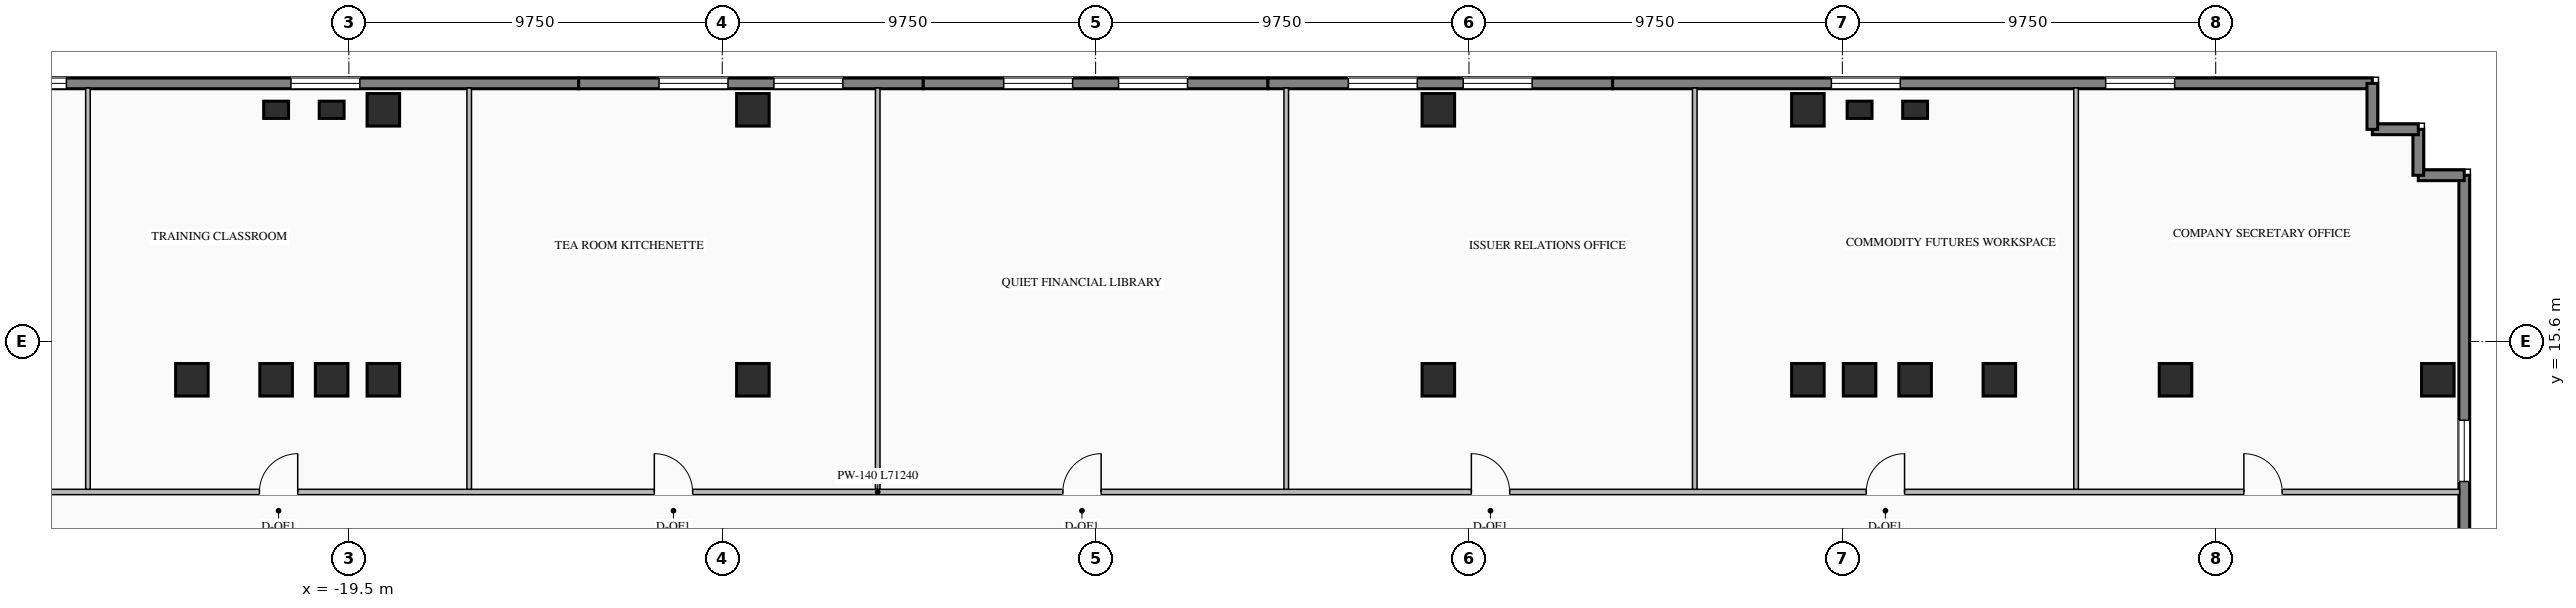
"""IFC4 building model, lengths in metres.
Left out: names, types, materials, properties, quantities, classifications, styles, units other than length and angle.
Written with IfcOpenShell. Run it as: python <this file> out.ifc"""

import sys

from ifc_helpers import new_model, si_unit, direction, frame, frame_2d, origin, origin_2d, place, context, subcontext, project, spatial, rectangle, i_section, extrude, element, fill, save


model = new_model("IFC4")
c1 = context("Model", 3, precision=1e-05, world=origin(), true_north=direction((0.0, 1.0)))
c2 = subcontext(c1, "Body", "Model", "MODEL_VIEW")
j1 = project(units=[si_unit("LENGTHUNIT", "METRE"), si_unit("PLANEANGLEUNIT", "RADIAN")], contexts=[c1])
p1 = place(None, origin())
s1 = spatial("IfcSite", under=j1, at=p1, CompositionType="ELEMENT")
p2 = place(p1, origin())
s2 = spatial("IfcBuilding", under=s1, at=p2, CompositionType="ELEMENT")
p3 = place(p2, frame((0.0, 0.0, 58.8)))
s3 = spatial("IfcBuildingStorey", under=s2, at=p3, CompositionType="ELEMENT", Elevation=58.8)
for number, where, z_axis, x_axis in (
    (1, (-21.4, 14.6, 0.0), (0.0, 0.0, 1.0), (1.0, 0.0, 0.0)),
    (2, (-19.95, 14.6, 0.0), (0.0, 0.0, 1.0), (1.0, 0.0, 0.0)),
    (3, (-18.6, 14.6, 0.0), (0.0, 0.0, 1.0), (1.0, 0.0, 0.0)),
    (4, (-8.95, 14.6, 0.0), (0.0, 0.0, 1.0), (1.0, 0.0, 0.0)),
    (5, (8.95, 14.6, 0.0), (0.0, 0.0, 1.0), (1.0, 0.0, 0.0)),
    (6, (18.6, 14.6, 0.0), (0.0, 0.0, 1.0), (1.0, 0.0, 0.0)),
    (7, (19.95, 14.6, 0.0), (0.0, 0.0, 1.0), (1.0, 0.0, 0.0)),
    (8, (21.4, 14.6, 0.0), (0.0, 0.0, 1.0), (1.0, 0.0, 0.0)),
    (9, (-23.6, 14.6, 0.0), (0.0, 0.0, 1.0), (1.0, 0.0, 0.0)),
    (10, (23.6, 14.6, 0.0), (0.0, 0.0, 1.0), (1.0, 0.0, 0.0)),
    (11, (28.2, 14.6, 0.0), (0.0, 0.0, 1.0), (1.0, 0.0, 0.0)),
    (12, (-18.6, 21.65, 0.0), (0.0, 0.0, 1.0), (1.0, 0.0, 0.0)),
    (13, (-8.95, 21.65, 0.0), (0.0, 0.0, 1.0), (1.0, 0.0, 0.0)),
    (14, (8.95, 21.65, 0.0), (0.0, 0.0, 1.0), (1.0, 0.0, 0.0)),
    (15, (18.6, 21.65, 0.0), (0.0, 0.0, 1.0), (1.0, 0.0, 0.0)),
    (16, (35.05, 14.6, 0.0), (0.0, 0.0, 1.0), (1.0, 0.0, 0.0)),
):
    element("IfcColumn", number, at=place(p3, frame(where, z_axis=z_axis, x_axis=x_axis)), inside=s3, PredefinedType="COLUMN", context=c2, shape_type="SweptSolid", body=[
        extrude(i_section(OverallWidth=0.85, OverallDepth=0.85, WebThickness=0.032, FlangeThickness=0.048, at=origin_2d()), origin(), (0.0, 0.0, 1.0), 3.45),
    ])
for number, where, z_axis, x_axis in (
    (17, (-21.4, 21.65, 0.0), (0.0, 0.0, 1.0), (1.0, 0.0, 0.0)),
    (18, (-19.95, 21.65, 0.0), (0.0, 0.0, 1.0), (1.0, 0.0, 0.0)),
    (19, (19.95, 21.65, 0.0), (0.0, 0.0, 1.0), (1.0, 0.0, 0.0)),
    (20, (21.4, 21.65, 0.0), (0.0, 0.0, 1.0), (1.0, 0.0, 0.0)),
):
    element("IfcColumn", number, at=place(p3, frame(where, z_axis=z_axis, x_axis=x_axis)), inside=s3, PredefinedType="PILASTER", context=c2, shape_type="SweptSolid", body=[
        extrude(rectangle(XDim=0.65, YDim=0.45, at=origin_2d()), origin(), (0.0, 0.0, 1.0), 3.45),
    ])
p4 = place(p3, frame((-33.34, 22.34, 0.0), z_axis=(0.0, 0.0, 1.0), x_axis=(1.0, 0.0, 0.0)))
e21 = element("IfcWall", 21, at=p4, inside=s3, PredefinedType="STANDARD", context=c2, shape_type="SweptSolid", body=[
    extrude(rectangle(XDim=19.84, YDim=0.28, at=frame_2d((9.92, 0.0))), origin(), (0.0, 0.0, 1.0), 3.25),
])
p5 = place(p4, frame((4.663, 0.0, 0.76)))
e22 = element("IfcOpeningElement", 22, at=p5, cuts=e21, PredefinedType="OPENING", context=c2, shape_type="SweptSolid", body=[
    extrude(rectangle(XDim=1.8, YDim=1.95, at=frame_2d((0.9, 0.975))), frame((0.0, 0.15, 0.0), z_axis=(0.0, -1.0, 0.0), x_axis=(1.0, 0.0, 0.0)), (0.0, 0.0, 1.0), 0.3),
])
p6 = place(p4, frame((12.327, 0.0, 0.76)))
e23 = element("IfcOpeningElement", 23, at=p6, cuts=e21, PredefinedType="OPENING", context=c2, shape_type="SweptSolid", body=[
    extrude(rectangle(XDim=1.8, YDim=1.95, at=frame_2d((0.9, 0.975))), frame((0.0, 0.15, 0.0), z_axis=(0.0, -1.0, 0.0), x_axis=(1.0, 0.0, 0.0)), (0.0, 0.0, 1.0), 0.3),
])
p7 = place(p3, frame((-13.5, 22.34, 0.0), z_axis=(0.0, 0.0, 1.0), x_axis=(1.0, 0.0, 0.0)))
e24 = element("IfcWall", 24, at=p7, inside=s3, PredefinedType="STANDARD", context=c2, shape_type="SweptSolid", body=[
    extrude(rectangle(XDim=9.0, YDim=0.28, at=frame_2d((4.5, 0.0))), origin(), (0.0, 0.0, 1.0), 3.25),
])
p8 = place(p7, frame((2.1, 0.0, 0.76)))
e25 = element("IfcOpeningElement", 25, at=p8, cuts=e24, PredefinedType="OPENING", context=c2, shape_type="SweptSolid", body=[
    extrude(rectangle(XDim=1.8, YDim=1.95, at=frame_2d((0.9, 0.975))), frame((0.0, 0.15, 0.0), z_axis=(0.0, -1.0, 0.0), x_axis=(1.0, 0.0, 0.0)), (0.0, 0.0, 1.0), 0.3),
])
p9 = place(p7, frame((5.1, 0.0, 0.76)))
e26 = element("IfcOpeningElement", 26, at=p9, cuts=e24, PredefinedType="OPENING", context=c2, shape_type="SweptSolid", body=[
    extrude(rectangle(XDim=1.8, YDim=1.95, at=frame_2d((0.9, 0.975))), frame((0.0, 0.15, 0.0), z_axis=(0.0, -1.0, 0.0), x_axis=(1.0, 0.0, 0.0)), (0.0, 0.0, 1.0), 0.3),
])
p10 = place(p3, frame((-4.5, 22.34, 0.0), z_axis=(0.0, 0.0, 1.0), x_axis=(1.0, 0.0, 0.0)))
e27 = element("IfcWall", 27, at=p10, inside=s3, PredefinedType="STANDARD", context=c2, shape_type="SweptSolid", body=[
    extrude(rectangle(XDim=9.0, YDim=0.28, at=frame_2d((4.5, 0.0))), origin(), (0.0, 0.0, 1.0), 3.25),
])
p11 = place(p10, frame((2.1, 0.0, 0.76)))
e28 = element("IfcOpeningElement", 28, at=p11, cuts=e27, PredefinedType="OPENING", context=c2, shape_type="SweptSolid", body=[
    extrude(rectangle(XDim=1.8, YDim=1.95, at=frame_2d((0.9, 0.975))), frame((0.0, 0.15, 0.0), z_axis=(0.0, -1.0, 0.0), x_axis=(1.0, 0.0, 0.0)), (0.0, 0.0, 1.0), 0.3),
])
p12 = place(p10, frame((5.1, 0.0, 0.76)))
e29 = element("IfcOpeningElement", 29, at=p12, cuts=e27, PredefinedType="OPENING", context=c2, shape_type="SweptSolid", body=[
    extrude(rectangle(XDim=1.8, YDim=1.95, at=frame_2d((0.9, 0.975))), frame((0.0, 0.15, 0.0), z_axis=(0.0, -1.0, 0.0), x_axis=(1.0, 0.0, 0.0)), (0.0, 0.0, 1.0), 0.3),
])
p13 = place(p3, frame((4.5, 22.34, 0.0), z_axis=(0.0, 0.0, 1.0), x_axis=(1.0, 0.0, 0.0)))
e30 = element("IfcWall", 30, at=p13, inside=s3, PredefinedType="STANDARD", context=c2, shape_type="SweptSolid", body=[
    extrude(rectangle(XDim=9.0, YDim=0.28, at=frame_2d((4.5, 0.0))), origin(), (0.0, 0.0, 1.0), 3.25),
])
p14 = place(p13, frame((2.1, 0.0, 0.76)))
e31 = element("IfcOpeningElement", 31, at=p14, cuts=e30, PredefinedType="OPENING", context=c2, shape_type="SweptSolid", body=[
    extrude(rectangle(XDim=1.8, YDim=1.95, at=frame_2d((0.9, 0.975))), frame((0.0, 0.15, 0.0), z_axis=(0.0, -1.0, 0.0), x_axis=(1.0, 0.0, 0.0)), (0.0, 0.0, 1.0), 0.3),
])
p15 = place(p13, frame((5.1, 0.0, 0.76)))
e32 = element("IfcOpeningElement", 32, at=p15, cuts=e30, PredefinedType="OPENING", context=c2, shape_type="SweptSolid", body=[
    extrude(rectangle(XDim=1.8, YDim=1.95, at=frame_2d((0.9, 0.975))), frame((0.0, 0.15, 0.0), z_axis=(0.0, -1.0, 0.0), x_axis=(1.0, 0.0, 0.0)), (0.0, 0.0, 1.0), 0.3),
])
p16 = place(p3, frame((13.5, 22.34, 0.0), z_axis=(0.0, 0.0, 1.0), x_axis=(1.0, 0.0, 0.0)))
e33 = element("IfcWall", 33, at=p16, inside=s3, PredefinedType="STANDARD", context=c2, shape_type="SweptSolid", body=[
    extrude(rectangle(XDim=19.84, YDim=0.28, at=frame_2d((9.92, 0.0))), origin(), (0.0, 0.0, 1.0), 3.25),
])
p17 = place(p16, frame((5.713, 0.0, 0.76)))
e34 = element("IfcOpeningElement", 34, at=p17, cuts=e33, PredefinedType="OPENING", context=c2, shape_type="SweptSolid", body=[
    extrude(rectangle(XDim=1.8, YDim=1.95, at=frame_2d((0.9, 0.975))), frame((0.0, 0.15, 0.0), z_axis=(0.0, -1.0, 0.0), x_axis=(1.0, 0.0, 0.0)), (0.0, 0.0, 1.0), 0.3),
])
p18 = place(p16, frame((12.877, 0.0, 0.76)))
e35 = element("IfcOpeningElement", 35, at=p18, cuts=e33, PredefinedType="OPENING", context=c2, shape_type="SweptSolid", body=[
    extrude(rectangle(XDim=1.8, YDim=1.95, at=frame_2d((0.9, 0.975))), frame((0.0, 0.15, 0.0), z_axis=(0.0, -1.0, 0.0), x_axis=(1.0, 0.0, 0.0)), (0.0, 0.0, 1.0), 0.3),
])
p19 = place(p3, frame((35.74, 19.94, 0.0), z_axis=(0.0, 0.0, 1.0), x_axis=(0.0, -1.0, 0.0)))
e36 = element("IfcWall", 36, at=p19, inside=s3, PredefinedType="STANDARD", context=c2, shape_type="SweptSolid", body=[
    extrude(rectangle(XDim=19.94, YDim=0.28, at=frame_2d((9.97, 0.0))), origin(), (0.0, 0.0, 1.0), 3.25),
])
p20 = place(p19, frame((6.397, 0.0, 0.76)))
e37 = element("IfcOpeningElement", 37, at=p20, cuts=e36, PredefinedType="OPENING", context=c2, shape_type="SweptSolid", body=[
    extrude(rectangle(XDim=1.6, YDim=1.95, at=frame_2d((0.8, 0.975))), frame((0.0, 0.15, 0.0), z_axis=(0.0, -1.0, 0.0), x_axis=(1.0, 0.0, 0.0)), (0.0, 0.0, 1.0), 0.3),
])
p21 = place(p19, frame((12.493, 0.0, 0.76)))
e38 = element("IfcOpeningElement", 38, at=p21, cuts=e36, PredefinedType="OPENING", context=c2, shape_type="SweptSolid", body=[
    extrude(rectangle(XDim=1.6, YDim=1.95, at=frame_2d((0.8, 0.975))), frame((0.0, 0.15, 0.0), z_axis=(0.0, -1.0, 0.0), x_axis=(1.0, 0.0, 0.0)), (0.0, 0.0, 1.0), 0.3),
])
for number, where, z_axis, x_axis in (
    (39, (35.74, 19.94, 0.0), (0.0, 0.0, 1.0), (-1.0, 0.0, 0.0)),
    (40, (34.54, 19.94, 0.0), (0.0, 0.0, 1.0), (0.0, 1.0, 0.0)),
    (41, (34.54, 21.14, 0.0), (0.0, 0.0, 1.0), (-1.0, 0.0, 0.0)),
):
    element("IfcWall", number, at=place(p3, frame(where, z_axis=z_axis, x_axis=x_axis)), inside=s3, PredefinedType="STANDARD", context=c2, shape_type="SweptSolid", body=[
        extrude(rectangle(XDim=1.2, YDim=0.28, at=frame_2d((0.6, 0.0))), origin(), (0.0, 0.0, 1.0), 3.25),
    ])
p22 = place(p3, frame((33.34, 21.14, 0.0), z_axis=(0.0, 0.0, 1.0), x_axis=(0.0, 1.0, 0.0)))
e42 = element("IfcWall", 42, at=p22, inside=s3, PredefinedType="STANDARD", context=c2, shape_type="SweptSolid", body=[
    extrude(rectangle(XDim=1.2, YDim=0.28, at=frame_2d((0.6, 0.0))), origin(), (0.0, 0.0, 1.0), 3.25),
])
p23 = place(p3, frame((-35.62, 11.67, 0.0), z_axis=(0.0, 0.0, 1.0), x_axis=(1.0, 0.0, 0.0)))
e43 = element("IfcWall", 43, at=p23, inside=s3, PredefinedType="STANDARD", context=c2, shape_type="SweptSolid", body=[
    extrude(rectangle(XDim=71.24, YDim=0.14, at=frame_2d((35.62, 0.0))), origin(), (0.0, 0.0, 1.0), 3.25),
])
p24 = place(p23, frame((4.279, 0.0, 0.0)))
e44 = element("IfcOpeningElement", 44, at=p24, cuts=e43, PredefinedType="OPENING", context=c2, shape_type="SweptSolid", body=[
    extrude(rectangle(XDim=1.0, YDim=2.08, at=frame_2d((0.5, 1.04))), frame((0.0, 0.08, 0.0), z_axis=(0.0, -1.0, 0.0), x_axis=(1.0, 0.0, 0.0)), (0.0, 0.0, 1.0), 0.16),
])
p25 = place(p23, frame((13.784, 0.0, 0.0)))
e45 = element("IfcOpeningElement", 45, at=p25, cuts=e43, PredefinedType="OPENING", context=c2, shape_type="SweptSolid", body=[
    extrude(rectangle(XDim=1.0, YDim=2.08, at=frame_2d((0.5, 1.04))), frame((0.0, 0.08, 0.0), z_axis=(0.0, -1.0, 0.0), x_axis=(1.0, 0.0, 0.0)), (0.0, 0.0, 1.0), 0.16),
])
p26 = place(p23, frame((24.096, 0.0, 0.0)))
e46 = element("IfcOpeningElement", 46, at=p26, cuts=e43, PredefinedType="OPENING", context=c2, shape_type="SweptSolid", body=[
    extrude(rectangle(XDim=1.0, YDim=2.08, at=frame_2d((0.5, 1.04))), frame((0.0, 0.08, 0.0), z_axis=(0.0, -1.0, 0.0), x_axis=(1.0, 0.0, 0.0)), (0.0, 0.0, 1.0), 0.16),
])
p27 = place(p23, frame((34.764, 0.0, 0.0)))
e47 = element("IfcOpeningElement", 47, at=p27, cuts=e43, PredefinedType="OPENING", context=c2, shape_type="SweptSolid", body=[
    extrude(rectangle(XDim=1.0, YDim=2.08, at=frame_2d((0.5, 1.04))), frame((0.0, 0.08, 0.0), z_axis=(0.0, -1.0, 0.0), x_axis=(1.0, 0.0, 0.0)), (0.0, 0.0, 1.0), 0.16),
])
p28 = place(p23, frame((45.432, 0.0, 0.0)))
e48 = element("IfcOpeningElement", 48, at=p28, cuts=e43, PredefinedType="OPENING", context=c2, shape_type="SweptSolid", body=[
    extrude(rectangle(XDim=1.0, YDim=2.08, at=frame_2d((0.5, 1.04))), frame((0.0, 0.08, 0.0), z_axis=(0.0, -1.0, 0.0), x_axis=(1.0, 0.0, 0.0)), (0.0, 0.0, 1.0), 0.16),
])
p29 = place(p23, frame((55.744, 0.0, 0.0)))
e49 = element("IfcOpeningElement", 49, at=p29, cuts=e43, PredefinedType="OPENING", context=c2, shape_type="SweptSolid", body=[
    extrude(rectangle(XDim=1.0, YDim=2.08, at=frame_2d((0.5, 1.04))), frame((0.0, 0.08, 0.0), z_axis=(0.0, -1.0, 0.0), x_axis=(1.0, 0.0, 0.0)), (0.0, 0.0, 1.0), 0.16),
])
p30 = place(p23, frame((65.605, 0.0, 0.0)))
e50 = element("IfcOpeningElement", 50, at=p30, cuts=e43, PredefinedType="OPENING", context=c2, shape_type="SweptSolid", body=[
    extrude(rectangle(XDim=1.0, YDim=2.08, at=frame_2d((0.5, 1.04))), frame((0.0, 0.08, 0.0), z_axis=(0.0, -1.0, 0.0), x_axis=(1.0, 0.0, 0.0)), (0.0, 0.0, 1.0), 0.16),
])
for number, where, z_axis, x_axis in (
    (51, (-26.314, 11.74, 0.0), (0.0, 0.0, 1.0), (0.0, 1.0, 0.0)),
    (52, (-16.358, 11.74, 0.0), (0.0, 0.0, 1.0), (0.0, 1.0, 0.0)),
    (53, (-5.69, 11.74, 0.0), (0.0, 0.0, 1.0), (0.0, 1.0, 0.0)),
    (54, (4.978, 11.74, 0.0), (0.0, 0.0, 1.0), (0.0, 1.0, 0.0)),
    (55, (15.646, 11.74, 0.0), (0.0, 0.0, 1.0), (0.0, 1.0, 0.0)),
    (56, (25.603, 11.74, 0.0), (0.0, 0.0, 1.0), (0.0, 1.0, 0.0)),
):
    element("IfcWall", number, at=place(p3, frame(where, z_axis=z_axis, x_axis=x_axis)), inside=s3, PredefinedType="STANDARD", context=c2, shape_type="SweptSolid", body=[
        extrude(rectangle(XDim=10.48, YDim=0.12, at=frame_2d((5.24, 0.0))), origin(), (0.0, 0.0, 1.0), 3.25),
    ])
p31 = place(p5, origin())
e57 = element("IfcWindow", 57, at=p31, inside=s3, PartitioningType="SINGLE_PANEL", PredefinedType="WINDOW", context=c2, shape_type="SweptSolid", body=[
    extrude(rectangle(XDim=1.8, YDim=1.95, at=frame_2d((0.9, 0.975))), frame((0.0, 0.03, 0.0), z_axis=(0.0, -1.0, 0.0), x_axis=(1.0, 0.0, 0.0)), (0.0, 0.0, 1.0), 0.06),
])
fill(e22, e57)
p32 = place(p6, origin())
e58 = element("IfcWindow", 58, at=p32, inside=s3, PartitioningType="SINGLE_PANEL", PredefinedType="WINDOW", context=c2, shape_type="SweptSolid", body=[
    extrude(rectangle(XDim=1.8, YDim=1.95, at=frame_2d((0.9, 0.975))), frame((0.0, 0.03, 0.0), z_axis=(0.0, -1.0, 0.0), x_axis=(1.0, 0.0, 0.0)), (0.0, 0.0, 1.0), 0.06),
])
fill(e23, e58)
p33 = place(p8, origin())
e59 = element("IfcWindow", 59, at=p33, inside=s3, PartitioningType="SINGLE_PANEL", PredefinedType="WINDOW", context=c2, shape_type="SweptSolid", body=[
    extrude(rectangle(XDim=1.8, YDim=1.95, at=frame_2d((0.9, 0.975))), frame((0.0, 0.03, 0.0), z_axis=(0.0, -1.0, 0.0), x_axis=(1.0, 0.0, 0.0)), (0.0, 0.0, 1.0), 0.06),
])
fill(e25, e59)
p34 = place(p9, origin())
e60 = element("IfcWindow", 60, at=p34, inside=s3, PartitioningType="SINGLE_PANEL", PredefinedType="WINDOW", context=c2, shape_type="SweptSolid", body=[
    extrude(rectangle(XDim=1.8, YDim=1.95, at=frame_2d((0.9, 0.975))), frame((0.0, 0.03, 0.0), z_axis=(0.0, -1.0, 0.0), x_axis=(1.0, 0.0, 0.0)), (0.0, 0.0, 1.0), 0.06),
])
fill(e26, e60)
p35 = place(p11, origin())
e61 = element("IfcWindow", 61, at=p35, inside=s3, PartitioningType="SINGLE_PANEL", PredefinedType="WINDOW", context=c2, shape_type="SweptSolid", body=[
    extrude(rectangle(XDim=1.8, YDim=1.95, at=frame_2d((0.9, 0.975))), frame((0.0, 0.03, 0.0), z_axis=(0.0, -1.0, 0.0), x_axis=(1.0, 0.0, 0.0)), (0.0, 0.0, 1.0), 0.06),
])
fill(e28, e61)
p36 = place(p12, origin())
e62 = element("IfcWindow", 62, at=p36, inside=s3, PartitioningType="SINGLE_PANEL", PredefinedType="WINDOW", context=c2, shape_type="SweptSolid", body=[
    extrude(rectangle(XDim=1.8, YDim=1.95, at=frame_2d((0.9, 0.975))), frame((0.0, 0.03, 0.0), z_axis=(0.0, -1.0, 0.0), x_axis=(1.0, 0.0, 0.0)), (0.0, 0.0, 1.0), 0.06),
])
fill(e29, e62)
p37 = place(p14, origin())
e63 = element("IfcWindow", 63, at=p37, inside=s3, PartitioningType="SINGLE_PANEL", PredefinedType="WINDOW", context=c2, shape_type="SweptSolid", body=[
    extrude(rectangle(XDim=1.8, YDim=1.95, at=frame_2d((0.9, 0.975))), frame((0.0, 0.03, 0.0), z_axis=(0.0, -1.0, 0.0), x_axis=(1.0, 0.0, 0.0)), (0.0, 0.0, 1.0), 0.06),
])
fill(e31, e63)
p38 = place(p15, origin())
e64 = element("IfcWindow", 64, at=p38, inside=s3, PartitioningType="SINGLE_PANEL", PredefinedType="WINDOW", context=c2, shape_type="SweptSolid", body=[
    extrude(rectangle(XDim=1.8, YDim=1.95, at=frame_2d((0.9, 0.975))), frame((0.0, 0.03, 0.0), z_axis=(0.0, -1.0, 0.0), x_axis=(1.0, 0.0, 0.0)), (0.0, 0.0, 1.0), 0.06),
])
fill(e32, e64)
p39 = place(p17, origin())
e65 = element("IfcWindow", 65, at=p39, inside=s3, PartitioningType="SINGLE_PANEL", PredefinedType="WINDOW", context=c2, shape_type="SweptSolid", body=[
    extrude(rectangle(XDim=1.8, YDim=1.95, at=frame_2d((0.9, 0.975))), frame((0.0, 0.03, 0.0), z_axis=(0.0, -1.0, 0.0), x_axis=(1.0, 0.0, 0.0)), (0.0, 0.0, 1.0), 0.06),
])
fill(e34, e65)
p40 = place(p18, origin())
e66 = element("IfcWindow", 66, at=p40, inside=s3, PartitioningType="SINGLE_PANEL", PredefinedType="WINDOW", context=c2, shape_type="SweptSolid", body=[
    extrude(rectangle(XDim=1.8, YDim=1.95, at=frame_2d((0.9, 0.975))), frame((0.0, 0.03, 0.0), z_axis=(0.0, -1.0, 0.0), x_axis=(1.0, 0.0, 0.0)), (0.0, 0.0, 1.0), 0.06),
])
fill(e35, e66)
p41 = place(p20, origin())
e67 = element("IfcWindow", 67, at=p41, inside=s3, PartitioningType="SINGLE_PANEL", PredefinedType="WINDOW", context=c2, shape_type="SweptSolid", body=[
    extrude(rectangle(XDim=1.6, YDim=1.95, at=frame_2d((0.8, 0.975))), frame((0.0, 0.03, 0.0), z_axis=(0.0, -1.0, 0.0), x_axis=(1.0, 0.0, 0.0)), (0.0, 0.0, 1.0), 0.06),
])
fill(e37, e67)
p42 = place(p25, origin())
e68 = element("IfcDoor", 68, at=p42, inside=s3, OperationType="SINGLE_SWING_RIGHT", PredefinedType="DOOR", context=c2, shape_type="SweptSolid", body=[
    extrude(rectangle(XDim=1.0, YDim=2.08, at=frame_2d((0.5, 1.04))), frame((0.0, 0.025, 0.0), z_axis=(0.0, -1.0, 0.0), x_axis=(1.0, 0.0, 0.0)), (0.0, 0.0, 1.0), 0.05),
])
fill(e45, e68)
p43 = place(p26, origin())
e69 = element("IfcDoor", 69, at=p43, inside=s3, OperationType="SINGLE_SWING_LEFT", PredefinedType="DOOR", context=c2, shape_type="SweptSolid", body=[
    extrude(rectangle(XDim=1.0, YDim=2.08, at=frame_2d((0.5, 1.04))), frame((0.0, 0.025, 0.0), z_axis=(0.0, -1.0, 0.0), x_axis=(1.0, 0.0, 0.0)), (0.0, 0.0, 1.0), 0.05),
])
fill(e46, e69)
p44 = place(p27, origin())
e70 = element("IfcDoor", 70, at=p44, inside=s3, OperationType="SINGLE_SWING_RIGHT", PredefinedType="DOOR", context=c2, shape_type="SweptSolid", body=[
    extrude(rectangle(XDim=1.0, YDim=2.08, at=frame_2d((0.5, 1.04))), frame((0.0, 0.025, 0.0), z_axis=(0.0, -1.0, 0.0), x_axis=(1.0, 0.0, 0.0)), (0.0, 0.0, 1.0), 0.05),
])
fill(e47, e70)
p45 = place(p28, origin())
e71 = element("IfcDoor", 71, at=p45, inside=s3, OperationType="SINGLE_SWING_LEFT", PredefinedType="DOOR", context=c2, shape_type="SweptSolid", body=[
    extrude(rectangle(XDim=1.0, YDim=2.08, at=frame_2d((0.5, 1.04))), frame((0.0, 0.025, 0.0), z_axis=(0.0, -1.0, 0.0), x_axis=(1.0, 0.0, 0.0)), (0.0, 0.0, 1.0), 0.05),
])
fill(e48, e71)
p46 = place(p29, origin())
e72 = element("IfcDoor", 72, at=p46, inside=s3, OperationType="SINGLE_SWING_RIGHT", PredefinedType="DOOR", context=c2, shape_type="SweptSolid", body=[
    extrude(rectangle(XDim=1.0, YDim=2.08, at=frame_2d((0.5, 1.04))), frame((0.0, 0.025, 0.0), z_axis=(0.0, -1.0, 0.0), x_axis=(1.0, 0.0, 0.0)), (0.0, 0.0, 1.0), 0.05),
])
fill(e49, e72)
p47 = place(p30, origin())
e73 = element("IfcDoor", 73, at=p47, inside=s3, OperationType="SINGLE_SWING_LEFT", PredefinedType="DOOR", context=c2, shape_type="SweptSolid", body=[
    extrude(rectangle(XDim=1.0, YDim=2.08, at=frame_2d((0.5, 1.04))), frame((0.0, 0.025, 0.0), z_axis=(0.0, -1.0, 0.0), x_axis=(1.0, 0.0, 0.0)), (0.0, 0.0, 1.0), 0.05),
])
fill(e50, e73)
save(model, sys.argv[1])
